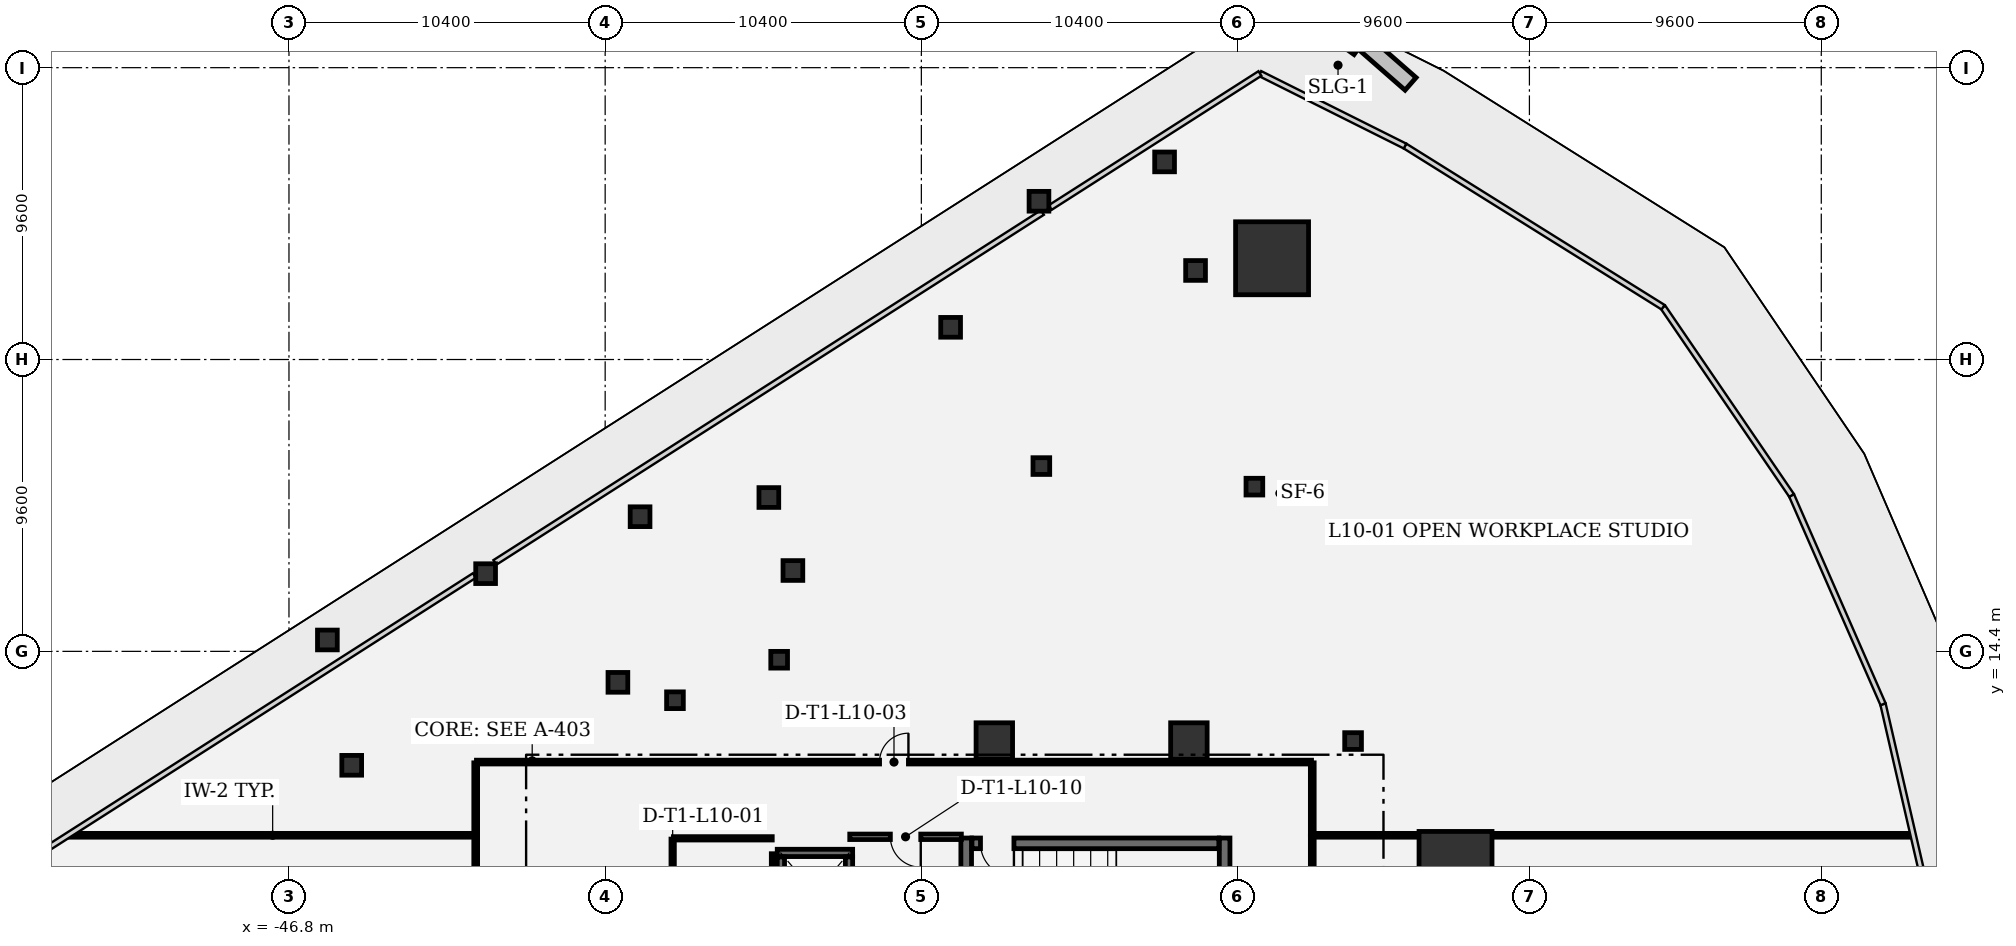
"""IFC4 building model, lengths in metres.
Left out: names, types, materials, properties, quantities, classifications, styles, units other than length and angle.
Written with IfcOpenShell. Run it as: python <this file> out.ifc"""

import sys

from ifc_helpers import new_model, si_unit, direction, frame, frame_2d, origin, origin_2d, place, context, subcontext, project, spatial, rectangle, extrude, element, fill, save


model = new_model("IFC4")
c1 = context("Model", 3, precision=1e-05, world=origin(), true_north=direction((0.0, 1.0)))
c2 = subcontext(c1, "Body", "Model", "MODEL_VIEW")
j1 = project(units=[si_unit("LENGTHUNIT", "METRE"), si_unit("PLANEANGLEUNIT", "RADIAN")], contexts=[c1])
p1 = place(None, origin())
s1 = spatial("IfcSite", under=j1, at=p1, CompositionType="ELEMENT")
p2 = place(p1, origin())
s2 = spatial("IfcBuilding", under=s1, at=p2, CompositionType="ELEMENT")
p3 = place(p2, frame((0.0, 0.0, 49.2)))
s3 = spatial("IfcBuildingStorey", under=s2, at=p3, CompositionType="ELEMENT", Elevation=49.2)
for number, where, z_axis, x_axis in (
    (1, (-8.43, 7.276, 0.0), (0.0, 0.0, 1.0), (1.0, 0.0, 0.0)),
    (2, (-14.464, 27.331, 0.0), (0.0, 0.0, 1.0), (1.0, 0.0, 0.0)),
):
    element("IfcColumn", number, at=place(p3, frame(where, z_axis=z_axis, x_axis=x_axis)), inside=s3, PredefinedType="COLUMN", context=c2, shape_type="SweptSolid", body=[
        extrude(rectangle(XDim=2.4, YDim=2.4, at=origin_2d()), origin(), (0.0, 0.0, 1.0), 4.2),
    ])
for number, where, z_axis, x_axis in (
    (3, (-23.6, 11.45, 0.0), (0.0, 0.0, 1.0), (1.0, 0.0, 0.0)),
    (4, (-17.2, 11.45, 0.0), (0.0, 0.0, 1.0), (1.0, 0.0, 0.0)),
):
    element("IfcColumn", number, at=place(p3, frame(where, z_axis=z_axis, x_axis=x_axis)), inside=s3, PredefinedType="COLUMN", context=c2, shape_type="SweptSolid", body=[
        extrude(rectangle(XDim=1.2, YDim=1.2, at=origin_2d()), origin(), (0.0, 0.0, 1.0), 4.2),
    ])
for number, where, z_axis, x_axis in (
    (5, (-45.536, 14.775, 0.0), (0.0, 0.0, 1.0), (1.0, 0.0, 0.0)),
    (6, (-22.131, 29.206, 0.0), (0.0, 0.0, 1.0), (1.0, 0.0, 0.0)),
    (7, (-40.333, 16.956, 0.0), (0.0, 0.0, 1.0), (1.0, 0.0, 0.0)),
    (8, (-18.0, 30.5, 0.0), (0.0, 0.0, 1.0), (1.0, 0.0, 0.0)),
    (9, (-35.252, 18.829, 0.0), (0.0, 0.0, 1.0), (1.0, 0.0, 0.0)),
    (10, (-25.038, 25.059, 0.0), (0.0, 0.0, 1.0), (1.0, 0.0, 0.0)),
    (11, (-31.016, 19.46, 0.0), (0.0, 0.0, 1.0), (1.0, 0.0, 0.0)),
    (12, (-44.736, 10.652, 0.0), (0.0, 0.0, 1.0), (1.0, 0.0, 0.0)),
    (13, (-16.981, 26.929, 0.0), (0.0, 0.0, 1.0), (1.0, 0.0, 0.0)),
    (14, (-35.981, 13.381, 0.0), (0.0, 0.0, 1.0), (1.0, 0.0, 0.0)),
    (15, (-30.225, 17.06, 0.0), (0.0, 0.0, 1.0), (1.0, 0.0, 0.0)),
):
    element("IfcColumn", number, at=place(p3, frame(where, z_axis=z_axis, x_axis=x_axis)), inside=s3, PredefinedType="COLUMN", context=c2, shape_type="SweptSolid", body=[
        extrude(rectangle(XDim=0.65, YDim=0.65, at=origin_2d()), origin(), (0.0, 0.0, 1.0), 4.2),
    ])
for number, where, z_axis, x_axis in (
    (16, (-34.104, 12.792, 0.0), (0.0, 0.0, 1.0), (1.0, 0.0, 0.0)),
    (17, (-22.053, 20.495, 0.0), (0.0, 0.0, 1.0), (1.0, 0.0, 0.0)),
    (18, (-30.677, 14.124, 0.0), (0.0, 0.0, 1.0), (1.0, 0.0, 0.0)),
    (19, (-15.046, 19.818, 0.0), (0.0, 0.0, 1.0), (1.0, 0.0, 0.0)),
    (20, (-11.8, 11.45, 0.0), (0.0, 0.0, 1.0), (1.0, 0.0, 0.0)),
):
    element("IfcColumn", number, at=place(p3, frame(where, z_axis=z_axis, x_axis=x_axis)), inside=s3, PredefinedType="COLUMN", context=c2, shape_type="SweptSolid", body=[
        extrude(rectangle(XDim=0.55, YDim=0.55, at=origin_2d()), origin(), (0.0, 0.0, 1.0), 4.2),
    ])
for number, where, z_axis, x_axis in (
    (21, (-24.525, 8.26, 0.0), (0.0, 0.0, 1.0), (0.0, -1.0, 0.0)),
    (22, (-16.025, 4.05, 0.0), (0.0, 0.0, 1.0), (0.0, 1.0, 0.0)),
):
    element("IfcWall", number, at=place(p3, frame(where, z_axis=z_axis, x_axis=x_axis)), inside=s3, PredefinedType="SHEAR", context=c2, shape_type="SweptSolid", body=[
        extrude(rectangle(XDim=4.21, YDim=0.35, at=frame_2d((2.105, 0.0))), origin(), (0.0, 0.0, 1.0), 3.92),
    ])
p4 = place(p3, frame((-16.215, 8.085, 0.0), z_axis=(0.0, 0.0, 1.0), x_axis=(-1.0, 0.0, 0.0)))
e23 = element("IfcWall", 23, at=p4, inside=s3, PredefinedType="SHEAR", context=c2, shape_type="SweptSolid", body=[
    extrude(rectangle(XDim=8.12, YDim=0.35, at=frame_2d((4.06, 0.0))), origin(), (0.0, 0.0, 1.0), 3.92),
])
p5 = place(p4, frame((6.74, 0.0, 0.0)))
e24 = element("IfcOpeningElement", 24, at=p5, cuts=e23, PredefinedType="OPENING", context=c2, shape_type="SweptSolid", body=[
    extrude(rectangle(XDim=1.1, YDim=2.2, at=frame_2d((0.55, 1.1))), frame((0.0, 0.185, 0.0), z_axis=(0.0, -1.0, 0.0), x_axis=(1.0, 0.0, 0.0)), (0.0, 0.0, 1.0), 0.37),
])
p6 = place(p3, frame((-30.74, 7.77, 0.0), z_axis=(0.0, 0.0, 1.0), x_axis=(1.0, 0.0, 0.0)))
e25 = element("IfcWall", 25, at=p6, inside=s3, PredefinedType="SHEAR", context=c2, shape_type="SweptSolid", body=[
    extrude(rectangle(XDim=2.48, YDim=0.24, at=frame_2d((1.24, 0.0))), origin(), (0.0, 0.0, 1.0), 3.92),
])
p7 = place(p3, frame((-30.62, 5.262, 0.0), z_axis=(0.0, 0.0, 1.0), x_axis=(0.0, 1.0, 0.0)))
e26 = element("IfcWall", 26, at=p7, inside=s3, PredefinedType="SHEAR", context=c2, shape_type="SweptSolid", body=[
    extrude(rectangle(XDim=2.376, YDim=0.24, at=frame_2d((1.188, 0.0))), origin(), (0.0, 0.0, 1.0), 3.92),
])
p8 = place(p3, frame((-28.38, 7.638, 0.0), z_axis=(0.0, 0.0, 1.0), x_axis=(0.0, -1.0, 0.0)))
e27 = element("IfcWall", 27, at=p8, inside=s3, PredefinedType="SHEAR", context=c2, shape_type="SweptSolid", body=[
    extrude(rectangle(XDim=2.376, YDim=0.24, at=frame_2d((1.188, 0.0))), origin(), (0.0, 0.0, 1.0), 3.92),
])
p9 = place(p8, frame((0.538, 0.0, 0.0)))
e28 = element("IfcOpeningElement", 28, at=p9, cuts=e27, PredefinedType="OPENING", context=c2, shape_type="SweptSolid", body=[
    extrude(rectangle(XDim=1.3, YDim=2.3, at=frame_2d((0.65, 1.15))), frame((0.0, 0.13, 0.0), z_axis=(0.0, -1.0, 0.0), x_axis=(1.0, 0.0, 0.0)), (0.0, 0.0, 1.0), 0.26),
])
p10 = place(p3, frame((-24.684, 8.3, 0.0), z_axis=(0.0, 0.0, 1.0), x_axis=(-1.0, 0.0, 0.0)))
e29 = element("IfcWall", 29, at=p10, inside=s3, PredefinedType="PARTITIONING", context=c2, shape_type="SweptSolid", body=[
    extrude(rectangle(XDim=3.671, YDim=0.18, at=frame_2d((1.835, 0.0))), origin(), (0.0, 0.0, 1.0), 3.92),
])
p11 = place(p10, frame((1.335, 0.0, 0.0)))
e30 = element("IfcOpeningElement", 30, at=p11, cuts=e29, PredefinedType="OPENING", context=c2, shape_type="SweptSolid", body=[
    extrude(rectangle(XDim=1.0, YDim=2.15, at=frame_2d((0.5, 1.075))), frame((0.0, 0.1, 0.0), z_axis=(0.0, -1.0, 0.0), x_axis=(1.0, 0.0, 0.0)), (0.0, 0.0, 1.0), 0.2),
])
p12 = place(p3, frame((-30.88, 5.815, 0.0), z_axis=(0.0, 0.0, 1.0), x_axis=(0.0, 1.0, 0.0)))
e31 = element("IfcWall", 31, at=p12, inside=s3, PredefinedType="PARTITIONING", context=c2, shape_type="SweptSolid", body=[
    extrude(rectangle(XDim=1.928, YDim=0.11, at=frame_2d((0.964, 0.0))), origin(), (0.0, 0.0, 1.0), 3.92),
])
p13 = place(p3, frame((-30.905, 8.25, 0.0), z_axis=(0.0, 0.0, 1.0), x_axis=(-1.0, 0.0, 0.0)))
e32 = element("IfcWall", 32, at=p13, inside=s3, PredefinedType="PARTITIONING", context=c2, shape_type="SweptSolid", body=[
    extrude(rectangle(XDim=3.25, YDim=0.11, at=frame_2d((1.625, 0.0))), origin(), (0.0, 0.0, 1.0), 3.92),
])
p14 = place(p3, frame((-34.18, 8.225, 0.0), z_axis=(0.0, 0.0, 1.0), x_axis=(0.0, -1.0, 0.0)))
e33 = element("IfcWall", 33, at=p14, inside=s3, PredefinedType="PARTITIONING", context=c2, shape_type="SweptSolid", body=[
    extrude(rectangle(XDim=3.385, YDim=0.11, at=frame_2d((1.692, 0.0))), origin(), (0.0, 0.0, 1.0), 3.92),
])
p15 = place(p14, frame((1.252, 0.0, 0.0)))
e34 = element("IfcOpeningElement", 34, at=p15, cuts=e33, PredefinedType="OPENING", context=c2, shape_type="SweptSolid", body=[
    extrude(rectangle(XDim=0.88, YDim=2.1, at=frame_2d((0.44, 1.05))), frame((0.0, 0.065, 0.0), z_axis=(0.0, -1.0, 0.0), x_axis=(1.0, 0.0, 0.0)), (0.0, 0.0, 1.0), 0.13),
])
p16 = place(p3, frame((-53.99, 8.35, 0.0), z_axis=(0.0, 0.0, 1.0), x_axis=(1.0, 0.0, 0.0)))
e35 = element("IfcWall", 35, at=p16, inside=s3, PredefinedType="PARTITIONING", context=c2, shape_type="SweptSolid", body=[
    extrude(rectangle(XDim=13.307, YDim=0.125, at=frame_2d((6.653, 0.0))), origin(), (0.0, 0.0, 1.0), 2.89),
])
p17 = place(p3, frame((-40.658, 10.733, 0.0), z_axis=(0.0, 0.0, 1.0), x_axis=(0.0, -1.0, 0.0)))
e36 = element("IfcWall", 36, at=p17, inside=s3, PredefinedType="PARTITIONING", context=c2, shape_type="SweptSolid", body=[
    extrude(rectangle(XDim=2.358, YDim=0.125, at=frame_2d((1.179, 0.0))), origin(), (0.0, 0.0, 1.0), 3.92),
])
p18 = place(p3, frame((-40.633, 10.758, 0.0), z_axis=(0.0, 0.0, 1.0), x_axis=(1.0, 0.0, 0.0)))
e37 = element("IfcWall", 37, at=p18, inside=s3, PredefinedType="PARTITIONING", context=c2, shape_type="SweptSolid", body=[
    extrude(rectangle(XDim=27.466, YDim=0.125, at=frame_2d((13.733, 0.0))), origin(), (0.0, 0.0, 1.0), 2.957),
])
p19 = place(p18, frame((13.258, 0.0, 0.0)))
e38 = element("IfcOpeningElement", 38, at=p19, cuts=e37, PredefinedType="OPENING", context=c2, shape_type="SweptSolid", body=[
    extrude(rectangle(XDim=0.95, YDim=2.15, at=frame_2d((0.475, 1.075))), frame((0.0, 0.073, 0.0), z_axis=(0.0, -1.0, 0.0), x_axis=(1.0, 0.0, 0.0)), (0.0, 0.0, 1.0), 0.145),
])
p20 = place(p3, frame((-13.142, 8.375, 0.0), z_axis=(0.0, 0.0, 1.0), x_axis=(0.0, 1.0, 0.0)))
e39 = element("IfcWall", 39, at=p20, inside=s3, PredefinedType="PARTITIONING", context=c2, shape_type="SweptSolid", body=[
    extrude(rectangle(XDim=2.358, YDim=0.125, at=frame_2d((1.179, 0.0))), origin(), (0.0, 0.0, 1.0), 3.92),
])
p21 = place(p3, frame((-13.117, 8.35, 0.0), z_axis=(0.0, 0.0, 1.0), x_axis=(1.0, 0.0, 0.0)))
e40 = element("IfcWall", 40, at=p21, inside=s3, PredefinedType="PARTITIONING", context=c2, shape_type="SweptSolid", body=[
    extrude(rectangle(XDim=3.422, YDim=0.125, at=frame_2d((1.711, 0.0))), origin(), (0.0, 0.0, 1.0), 2.957),
])
p22 = place(p3, frame((-7.165, 8.35, 0.0), z_axis=(0.0, 0.0, 1.0), x_axis=(1.0, 0.0, 0.0)))
e41 = element("IfcWall", 41, at=p22, inside=s3, PredefinedType="PARTITIONING", context=c2, shape_type="SweptSolid", body=[
    extrude(rectangle(XDim=13.71, YDim=0.125, at=frame_2d((6.855, 0.0))), origin(), (0.0, 0.0, 1.0), 3.92),
])
p23 = place(p3, frame((-13.142, 8.317, 0.0), z_axis=(0.0, 0.0, 1.0), x_axis=(0.0, -1.0, 0.0)))
e42 = element("IfcWall", 42, at=p23, inside=s3, PredefinedType="PARTITIONING", context=c2, shape_type="SweptSolid", body=[
    extrude(rectangle(XDim=7.493, YDim=0.125, at=frame_2d((3.746, 0.0))), origin(), (0.0, 0.0, 1.0), 3.92),
])
p24 = place(p23, frame((3.271, 0.0, 0.0)))
e43 = element("IfcOpeningElement", 43, at=p24, cuts=e42, PredefinedType="OPENING", context=c2, shape_type="SweptSolid", body=[
    extrude(rectangle(XDim=0.95, YDim=2.15, at=frame_2d((0.475, 1.075))), frame((0.0, 0.073, 0.0), z_axis=(0.0, -1.0, 0.0), x_axis=(1.0, 0.0, 0.0)), (0.0, 0.0, 1.0), 0.145),
])
p25 = place(p3, frame((-40.658, -8.517, 0.0), z_axis=(0.0, 0.0, 1.0), x_axis=(0.0, 1.0, 0.0)))
e44 = element("IfcWall", 44, at=p25, inside=s3, PredefinedType="PARTITIONING", context=c2, shape_type="SweptSolid", body=[
    extrude(rectangle(XDim=16.834, YDim=0.125, at=frame_2d((8.417, 0.0))), origin(), (0.0, 0.0, 1.0), 3.92),
])
p26 = place(p25, frame((7.942, 0.0, 0.0)))
e45 = element("IfcOpeningElement", 45, at=p26, cuts=e44, PredefinedType="OPENING", context=c2, shape_type="SweptSolid", body=[
    extrude(rectangle(XDim=0.95, YDim=2.15, at=frame_2d((0.475, 1.075))), frame((0.0, 0.073, 0.0), z_axis=(0.0, -1.0, 0.0), x_axis=(1.0, 0.0, 0.0)), (0.0, 0.0, 1.0), 0.145),
])
p27 = place(p5, origin())
e46 = element("IfcDoor", 46, at=p27, inside=s3, OperationType="SINGLE_SWING_LEFT", PredefinedType="DOOR", context=c2, shape_type="SweptSolid", body=[
    extrude(rectangle(XDim=1.1, YDim=2.2, at=frame_2d((0.55, 1.1))), frame((0.0, 0.025, 0.0), z_axis=(0.0, -1.0, 0.0), x_axis=(1.0, 0.0, 0.0)), (0.0, 0.0, 1.0), 0.05),
])
fill(e24, e46)
p28 = place(p19, origin())
e47 = element("IfcDoor", 47, at=p28, inside=s3, OperationType="SINGLE_SWING_RIGHT", PredefinedType="DOOR", context=c2, shape_type="SweptSolid", body=[
    extrude(rectangle(XDim=0.95, YDim=2.15, at=frame_2d((0.475, 1.075))), frame((0.0, 0.025, 0.0), z_axis=(0.0, -1.0, 0.0), x_axis=(1.0, 0.0, 0.0)), (0.0, 0.0, 1.0), 0.05),
])
fill(e38, e47)
p29 = place(p11, origin())
e48 = element("IfcDoor", 48, at=p29, inside=s3, OperationType="SINGLE_SWING_LEFT", PredefinedType="DOOR", context=c2, shape_type="SweptSolid", body=[
    extrude(rectangle(XDim=1.0, YDim=2.15, at=frame_2d((0.5, 1.075))), frame((0.0, 0.025, 0.0), z_axis=(0.0, -1.0, 0.0), x_axis=(1.0, 0.0, 0.0)), (0.0, 0.0, 1.0), 0.05),
])
fill(e30, e48)
save(model, sys.argv[1])
